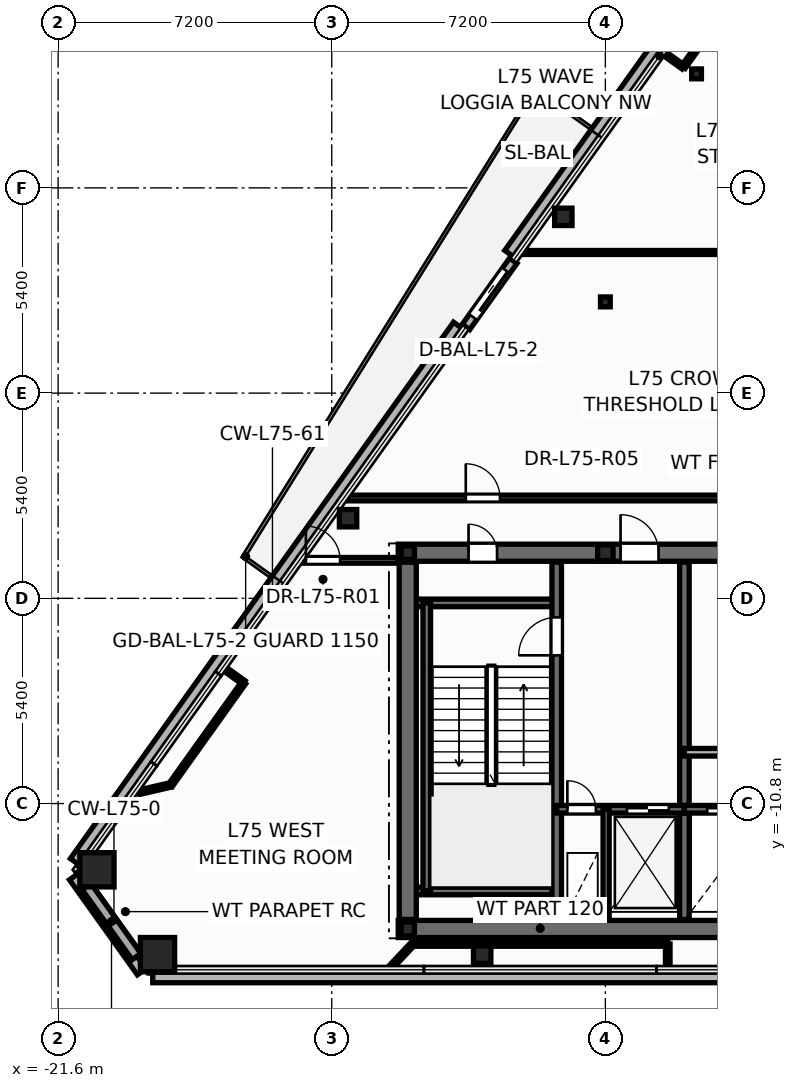
"""IFC4 building model, lengths in metres.
Left out: names, types, materials, properties, quantities, classifications, styles, units other than length and angle.
Written with IfcOpenShell. Run it as: python <this file> out.ifc"""

import sys

from ifc_helpers import new_model, si_unit, direction, frame, frame_2d, origin, origin_2d, place, context, subcontext, project, spatial, rectangle, hollow_rectangle, hollow_circle, i_section, extrude, element, fill, save


model = new_model("IFC4")
c1 = context("Model", 3, precision=1e-05, world=origin(), true_north=direction((0.0, 1.0)))
c2 = subcontext(c1, "Body", "Model", "MODEL_VIEW")
j1 = project(units=[si_unit("LENGTHUNIT", "METRE"), si_unit("PLANEANGLEUNIT", "RADIAN")], contexts=[c1])
p1 = place(None, origin())
s1 = spatial("IfcSite", under=j1, at=p1, CompositionType="ELEMENT")
p2 = place(p1, origin())
s2 = spatial("IfcBuilding", under=s1, at=p2, CompositionType="ELEMENT")
p3 = place(p2, frame((0.0, 0.0, 285.0)))
s3 = spatial("IfcBuildingStorey", under=s2, at=p3, CompositionType="ELEMENT", Elevation=285.0)
for number, where, z_axis, x_axis in (
    (1, (-20.579, -12.543, 0.0), (0.0, 0.0, 1.0), (1.0, 0.0, 0.0)),
    (2, (-18.985, -14.774, 0.0), (0.0, 0.0, 1.0), (1.0, 0.0, 0.0)),
):
    element("IfcColumn", number, at=place(p3, frame(where, z_axis=z_axis, x_axis=x_axis)), inside=s3, PredefinedType="COLUMN", context=c2, shape_type="SweptSolid", body=[
        extrude(hollow_rectangle(XDim=0.9, YDim=0.9, WallThickness=0.04, at=origin_2d()), origin(), (0.0, 0.0, 1.0), 4.2),
    ])
for number, where, z_axis, x_axis in (
    (3, (-10.442, -14.774, 0.0), (0.0, 0.0, 1.0), (1.0, 0.0, 0.0)),
    (4, (-8.306, 4.638, 0.0), (0.0, 0.0, 1.0), (1.0, 0.0, 0.0)),
    (5, (-13.97, -3.292, 0.0), (0.0, 0.0, 1.0), (1.0, 0.0, 0.0)),
):
    element("IfcColumn", number, at=place(p3, frame(where, z_axis=z_axis, x_axis=x_axis)), inside=s3, PredefinedType="COLUMN", context=c2, shape_type="SweptSolid", body=[
        extrude(hollow_circle(Radius=0.229, WallThickness=0.016, at=origin_2d()), origin(), (0.0, 0.0, 1.0), 4.2),
    ])
for number, where, z_axis, x_axis in (
    (6, (-12.4, -14.1, 0.0), (0.0, 0.0, 1.0), (1.0, 0.0, 0.0)),
    (7, (-12.4, -4.2, 0.0), (0.0, 0.0, 1.0), (1.0, 0.0, 0.0)),
):
    element("IfcColumn", number, at=place(p3, frame(where, z_axis=z_axis, x_axis=x_axis)), inside=s3, PredefinedType="COLUMN", context=c2, shape_type="SweptSolid", body=[
        extrude(i_section(OverallWidth=0.352, OverallDepth=0.359, WebThickness=0.018, FlangeThickness=0.026, at=origin_2d()), origin(), (0.0, 0.0, 1.0), 4.2),
    ])
p4 = place(p3, frame((-7.2, -4.2, 0.0), z_axis=(0.0, 0.0, 1.0), x_axis=(1.0, 0.0, 0.0)))
e8 = element("IfcColumn", 8, at=p4, inside=s3, PredefinedType="PILASTER", context=c2, shape_type="SweptSolid", body=[
    extrude(i_section(OverallWidth=0.405, OverallDepth=0.414, WebThickness=0.022, FlangeThickness=0.032, at=origin_2d()), origin(), (0.0, 0.0, 1.0), 4.2),
])
for number, where, z_axis, x_axis in (
    (9, (-7.2, 2.4, 0.0), (0.0, 0.0, 1.0), (1.0, 0.0, 0.0)),
    (10, (-4.8, 8.4, 0.0), (0.0, 0.0, 1.0), (1.0, 0.0, 0.0)),
):
    element("IfcColumn", number, at=place(p3, frame(where, z_axis=z_axis, x_axis=x_axis)), inside=s3, PredefinedType="COLUMN", context=c2, shape_type="SweptSolid", body=[
        extrude(i_section(OverallWidth=0.256, OverallDepth=0.26, WebThickness=0.01, FlangeThickness=0.017, at=origin_2d()), origin(), (0.0, 0.0, 1.0), 4.2),
    ])
p5 = place(p3, frame((-21.154, -12.701, -0.2), z_axis=(0.0, 0.0, 1.0), x_axis=(0.581260731052, -0.813717372641, 0.0)))
e11 = element("IfcWall", 11, at=p5, inside=s3, PredefinedType="PARAPET", context=c2, shape_type="SweptSolid", body=[
    extrude(rectangle(XDim=3.074, YDim=0.36, at=frame_2d((1.537, 0.0))), origin(), (0.0, 0.0, 1.0), 0.38),
])
p6 = place(p3, frame((-19.111, -15.334, -0.2), z_axis=(0.0, 0.0, 1.0), x_axis=(1.0, 0.0, 0.0)))
e12 = element("IfcWall", 12, at=p6, inside=s3, PredefinedType="PARAPET", context=c2, shape_type="SweptSolid", body=[
    extrude(rectangle(XDim=38.221, YDim=0.36, at=frame_2d((19.111, 0.0))), origin(), (0.0, 0.0, 1.0), 0.38),
])
p7 = place(p3, frame((-2.104, 14.285, -0.2), z_axis=(0.0, 0.0, 1.0), x_axis=(-0.581243494246, -0.81372968509, 0.0)))
e13 = element("IfcWall", 13, at=p7, inside=s3, PredefinedType="PARAPET", context=c2, shape_type="SweptSolid", body=[
    extrude(rectangle(XDim=13.071, YDim=0.36, at=frame_2d((6.536, 0.0))), origin(), (0.0, 0.0, 1.0), 0.38),
])
p8 = place(p3, frame((-11.05, 1.761, -0.2), z_axis=(0.0, 0.0, 1.0), x_axis=(-0.581240856875, -0.813731568946, 0.0)))
e14 = element("IfcWall", 14, at=p8, inside=s3, PredefinedType="PARAPET", context=c2, shape_type="SweptSolid", body=[
    extrude(rectangle(XDim=17.344, YDim=0.36, at=frame_2d((8.672, 0.0))), origin(), (0.0, 0.0, 1.0), 0.38),
])
p9 = place(p3, frame((-9.623, 3.482, -0.015), z_axis=(0.0, 0.0, 1.0), x_axis=(-0.581238193719, -0.813733471207, 0.0)))
e15 = element("IfcWall", 15, at=p9, inside=s3, PredefinedType="STANDARD", context=c2, shape_type="SweptSolid", body=[
    extrude(rectangle(XDim=2.14, YDim=0.24, at=frame_2d((1.07, 0.0))), origin(), (0.0, 0.0, 1.0), 3.453),
])
p10 = place(p9, frame((0.32, 0.0, 0.015)))
e16 = element("IfcOpeningElement", 16, at=p10, cuts=e15, PredefinedType="OPENING", context=c2, shape_type="SweptSolid", body=[
    extrude(rectangle(XDim=1.506, YDim=2.204, at=frame_2d((0.75, 1.102))), frame((0.0, 0.13, 0.0), z_axis=(0.0, -1.0, 0.0), x_axis=(1.0, 0.0, 0.0)), (0.0, 0.0, 1.0), 0.26),
])
p11 = place(p3, frame((-12.65, -14.1, 0.0), z_axis=(0.0, 0.0, 1.0), x_axis=(1.0, 0.0, 0.0)))
e17 = element("IfcWall", 17, at=p11, inside=s3, PredefinedType="SHEAR", context=c2, shape_type="SweptSolid", body=[
    extrude(rectangle(XDim=25.3, YDim=0.45, at=frame_2d((12.65, 0.0))), origin(), (0.0, 0.0, 1.0), 4.2),
])
p12 = place(p3, frame((-12.65, -4.2, 0.0), z_axis=(0.0, 0.0, 1.0), x_axis=(1.0, 0.0, 0.0)))
e18 = element("IfcWall", 18, at=p12, inside=s3, PredefinedType="SHEAR", context=c2, shape_type="SweptSolid", body=[
    extrude(rectangle(XDim=25.3, YDim=0.45, at=frame_2d((12.65, 0.0))), origin(), (0.0, 0.0, 1.0), 4.2),
])
p13 = place(p12, frame((1.85, 0.0, 0.0)))
e19 = element("IfcOpeningElement", 19, at=p13, cuts=e18, PredefinedType="OPENING", context=c2, shape_type="SweptSolid", body=[
    extrude(rectangle(XDim=0.756, YDim=2.054, at=frame_2d((0.375, 1.027))), frame((0.0, 0.235, 0.0), z_axis=(0.0, -1.0, 0.0), x_axis=(1.0, 0.0, 0.0)), (0.0, 0.0, 1.0), 0.47),
])
p14 = place(p12, frame((22.65, 0.0, 0.0)))
e20 = element("IfcOpeningElement", 20, at=p14, cuts=e18, PredefinedType="OPENING", context=c2, shape_type="SweptSolid", body=[
    extrude(rectangle(XDim=0.756, YDim=2.054, at=frame_2d((0.375, 1.027))), frame((0.0, 0.235, 0.0), z_axis=(0.0, -1.0, 0.0), x_axis=(1.0, 0.0, 0.0)), (0.0, 0.0, 1.0), 0.47),
])
p15 = place(p12, frame((5.85, 0.0, 0.0)))
e21 = element("IfcOpeningElement", 21, at=p15, cuts=e18, PredefinedType="OPENING", context=c2, shape_type="SweptSolid", body=[
    extrude(rectangle(XDim=1.006, YDim=2.104, at=frame_2d((0.5, 1.052))), frame((0.0, 0.235, 0.0), z_axis=(0.0, -1.0, 0.0), x_axis=(1.0, 0.0, 0.0)), (0.0, 0.0, 1.0), 0.47),
])
p16 = place(p12, frame((10.35, 0.0, 0.0)))
e22 = element("IfcOpeningElement", 22, at=p16, cuts=e18, PredefinedType="OPENING", context=c2, shape_type="SweptSolid", body=[
    extrude(rectangle(XDim=1.406, YDim=2.154, at=frame_2d((0.7, 1.077))), frame((0.0, 0.235, 0.0), z_axis=(0.0, -1.0, 0.0), x_axis=(1.0, 0.0, 0.0)), (0.0, 0.0, 1.0), 0.47),
])
p17 = place(p12, frame((18.45, 0.0, 0.0)))
e23 = element("IfcOpeningElement", 23, at=p17, cuts=e18, PredefinedType="OPENING", context=c2, shape_type="SweptSolid", body=[
    extrude(rectangle(XDim=1.006, YDim=2.104, at=frame_2d((0.5, 1.052))), frame((0.0, 0.235, 0.0), z_axis=(0.0, -1.0, 0.0), x_axis=(1.0, 0.0, 0.0)), (0.0, 0.0, 1.0), 0.47),
])
for number, where, z_axis, x_axis in (
    (24, (-12.35, -5.52, 0.0), (0.0, 0.0, 1.0), (1.0, 0.0, 0.0)),
    (25, (-12.35, -13.1, 0.0), (0.0, 0.0, 1.0), (1.0, 0.0, 0.0)),
):
    element("IfcWall", number, at=place(p3, frame(where, z_axis=z_axis, x_axis=x_axis)), inside=s3, PredefinedType="SOLIDWALL", context=c2, shape_type="SweptSolid", body=[
        extrude(rectangle(XDim=3.87, YDim=0.2, at=frame_2d((1.935, 0.0))), origin(), (0.0, 0.0, 1.0), 4.2),
    ])
p18 = place(p3, frame((-11.9, -13.1, 0.0), z_axis=(0.0, 0.0, 1.0), x_axis=(0.0, 1.0, 0.0)))
e26 = element("IfcWall", 26, at=p18, inside=s3, PredefinedType="SOLIDWALL", context=c2, shape_type="SweptSolid", body=[
    extrude(rectangle(XDim=7.58, YDim=0.2, at=frame_2d((3.79, 0.0))), origin(), (0.0, 0.0, 1.0), 4.2),
])
p19 = place(p3, frame((-8.48, -13.85, 0.0), z_axis=(0.0, 0.0, 1.0), x_axis=(0.0, 1.0, 0.0)))
e27 = element("IfcWall", 27, at=p19, inside=s3, PredefinedType="SHEAR", context=c2, shape_type="SweptSolid", body=[
    extrude(rectangle(XDim=9.4, YDim=0.25, at=frame_2d((4.7, 0.0))), origin(), (0.0, 0.0, 1.0), 4.2),
])
p20 = place(p19, frame((6.95, 0.0, 0.0)))
e28 = element("IfcOpeningElement", 28, at=p20, cuts=e27, PredefinedType="OPENING", context=c2, shape_type="SweptSolid", body=[
    extrude(rectangle(XDim=1.006, YDim=2.104, at=frame_2d((0.5, 1.052))), frame((0.0, 0.135, 0.0), z_axis=(0.0, -1.0, 0.0), x_axis=(1.0, 0.0, 0.0)), (0.0, 0.0, 1.0), 0.27),
])
p21 = place(p3, frame((-5.12, -13.85, 0.0), z_axis=(0.0, 0.0, 1.0), x_axis=(0.0, 1.0, 0.0)))
e29 = element("IfcWall", 29, at=p21, inside=s3, PredefinedType="SHEAR", context=c2, shape_type="SweptSolid", body=[
    extrude(rectangle(XDim=9.4, YDim=0.25, at=frame_2d((4.7, 0.0))), origin(), (0.0, 0.0, 1.0), 4.2),
])
p22 = place(p3, frame((-8.48, -10.95, 0.0), z_axis=(0.0, 0.0, 1.0), x_axis=(1.0, 0.0, 0.0)))
e30 = element("IfcWall", 30, at=p22, inside=s3, PredefinedType="SOLIDWALL", context=c2, shape_type="SweptSolid", body=[
    extrude(rectangle(XDim=3.36, YDim=0.2, at=frame_2d((1.68, 0.0))), origin(), (0.0, 0.0, 1.0), 4.2),
])
p23 = place(p22, frame((0.28, 0.0, 0.0)))
e31 = element("IfcOpeningElement", 31, at=p23, cuts=e30, PredefinedType="OPENING", context=c2, shape_type="SweptSolid", body=[
    extrude(rectangle(XDim=0.756, YDim=2.054, at=frame_2d((0.375, 1.027))), frame((0.0, 0.11, 0.0), z_axis=(0.0, -1.0, 0.0), x_axis=(1.0, 0.0, 0.0)), (0.0, 0.0, 1.0), 0.22),
])
p24 = place(p22, frame((1.85, 0.0, 0.0)))
e32 = element("IfcOpeningElement", 32, at=p24, cuts=e30, PredefinedType="OPENING", context=c2, shape_type="SweptSolid", body=[
    extrude(rectangle(XDim=1.106, YDim=2.104, at=frame_2d((0.55, 1.052))), frame((0.0, 0.11, 0.0), z_axis=(0.0, -1.0, 0.0), x_axis=(1.0, 0.0, 0.0)), (0.0, 0.0, 1.0), 0.22),
])
p25 = place(p3, frame((-5.12, -10.95, 0.0), z_axis=(0.0, 0.0, 1.0), x_axis=(1.0, 0.0, 0.0)))
e33 = element("IfcWall", 33, at=p25, inside=s3, PredefinedType="SOLIDWALL", context=c2, shape_type="SweptSolid", body=[
    extrude(rectangle(XDim=10.24, YDim=0.2, at=frame_2d((5.12, 0.0))), origin(), (0.0, 0.0, 1.0), 4.2),
])
p26 = place(p25, frame((0.6, 0.0, 0.0)))
e34 = element("IfcOpeningElement", 34, at=p26, cuts=e33, PredefinedType="OPENING", context=c2, shape_type="SweptSolid", body=[
    extrude(rectangle(XDim=1.106, YDim=2.104, at=frame_2d((0.55, 1.052))), frame((0.0, 0.11, 0.0), z_axis=(0.0, -1.0, 0.0), x_axis=(1.0, 0.0, 0.0)), (0.0, 0.0, 1.0), 0.22),
])
p27 = place(p25, frame((2.67, 0.0, 0.0)))
e35 = element("IfcOpeningElement", 35, at=p27, cuts=e33, PredefinedType="OPENING", context=c2, shape_type="SweptSolid", body=[
    extrude(rectangle(XDim=1.106, YDim=2.104, at=frame_2d((0.55, 1.052))), frame((0.0, 0.11, 0.0), z_axis=(0.0, -1.0, 0.0), x_axis=(1.0, 0.0, 0.0)), (0.0, 0.0, 1.0), 0.22),
])
p28 = place(p25, frame((4.57, 0.0, 0.0)))
e36 = element("IfcOpeningElement", 36, at=p28, cuts=e33, PredefinedType="OPENING", context=c2, shape_type="SweptSolid", body=[
    extrude(rectangle(XDim=1.106, YDim=2.104, at=frame_2d((0.55, 1.052))), frame((0.0, 0.11, 0.0), z_axis=(0.0, -1.0, 0.0), x_axis=(1.0, 0.0, 0.0)), (0.0, 0.0, 1.0), 0.22),
])
p29 = place(p25, frame((6.47, 0.0, 0.0)))
e37 = element("IfcOpeningElement", 37, at=p29, cuts=e33, PredefinedType="OPENING", context=c2, shape_type="SweptSolid", body=[
    extrude(rectangle(XDim=1.106, YDim=2.104, at=frame_2d((0.55, 1.052))), frame((0.0, 0.11, 0.0), z_axis=(0.0, -1.0, 0.0), x_axis=(1.0, 0.0, 0.0)), (0.0, 0.0, 1.0), 0.22),
])
p30 = place(p25, frame((8.54, 0.0, 0.0)))
e38 = element("IfcOpeningElement", 38, at=p30, cuts=e33, PredefinedType="OPENING", context=c2, shape_type="SweptSolid", body=[
    extrude(rectangle(XDim=1.106, YDim=2.104, at=frame_2d((0.55, 1.052))), frame((0.0, 0.11, 0.0), z_axis=(0.0, -1.0, 0.0), x_axis=(1.0, 0.0, 0.0)), (0.0, 0.0, 1.0), 0.22),
])
p31 = place(p3, frame((-7.18, -13.85, 0.0), z_axis=(0.0, 0.0, 1.0), x_axis=(0.0, 1.0, 0.0)))
e39 = element("IfcWall", 39, at=p31, inside=s3, PredefinedType="PARTITIONING", context=c2, shape_type="SweptSolid", body=[
    extrude(rectangle(XDim=2.9, YDim=0.16, at=frame_2d((1.45, 0.0))), origin(), (0.0, 0.0, 1.0), 3.145),
])
p32 = place(p3, frame((-12.4, -13.85, 0.0), z_axis=(0.0, 0.0, 1.0), x_axis=(0.0, 1.0, 0.0)))
e40 = element("IfcWall", 40, at=p32, inside=s3, PredefinedType="SHEAR", context=c2, shape_type="SweptSolid", body=[
    extrude(rectangle(XDim=9.4, YDim=0.45, at=frame_2d((4.7, 0.0))), origin(), (0.0, 0.0, 1.0), 4.2),
])
p33 = place(p3, frame((-5.12, -9.45, 0.0), z_axis=(0.0, 0.0, 1.0), x_axis=(1.0, 0.0, 0.0)))
e41 = element("IfcWall", 41, at=p33, inside=s3, PredefinedType="SOLIDWALL", context=c2, shape_type="SweptSolid", body=[
    extrude(rectangle(XDim=2.24, YDim=0.2, at=frame_2d((1.12, 0.0))), origin(), (0.0, 0.0, 1.0), 3.92),
])
p34 = place(p3, frame((-14.082, -2.76, 0.0), z_axis=(0.0, 0.0, 1.0), x_axis=(1.0, 0.0, 0.0)))
e42 = element("IfcWall", 42, at=p34, inside=s3, PredefinedType="PARTITIONING", context=c2, shape_type="SweptSolid", body=[
    extrude(rectangle(XDim=12.002, YDim=0.15, at=frame_2d((6.001, 0.0))), origin(), (0.0, 0.0, 1.0), 2.895),
])
p35 = place(p34, frame((3.209, 0.0, 0.0)))
e43 = element("IfcOpeningElement", 43, at=p35, cuts=e42, PredefinedType="OPENING", context=c2, shape_type="SweptSolid", body=[
    extrude(rectangle(XDim=0.906, YDim=2.104, at=frame_2d((0.45, 1.052))), frame((0.0, 0.085, 0.0), z_axis=(0.0, -1.0, 0.0), x_axis=(1.0, 0.0, 0.0)), (0.0, 0.0, 1.0), 0.17),
])
p36 = place(p3, frame((-9.468, 3.7, 0.0), z_axis=(0.0, 0.0, 1.0), x_axis=(1.0, 0.0, 0.0)))
e44 = element("IfcWall", 44, at=p36, inside=s3, PredefinedType="PARTITIONING", context=c2, shape_type="SweptSolid", body=[
    extrude(rectangle(XDim=10.108, YDim=0.105, at=frame_2d((5.054, 0.0))), origin(), (0.0, 0.0, 1.0), 2.895),
])
p37 = place(p3, frame((-12.27, -14.494, 0.0), z_axis=(0.0, 0.0, 1.0), x_axis=(1.0, 0.0, 0.0)))
e45 = element("IfcWall", 45, at=p37, inside=s3, PredefinedType="PARTITIONING", context=c2, shape_type="SweptSolid", body=[
    extrude(rectangle(XDim=6.711, YDim=0.12, at=frame_2d((3.356, 0.0))), origin(), (0.0, 0.0, 1.0), 3.438),
])
p38 = place(p3, frame((-16.716, -7.616, 0.0), z_axis=(0.0, 0.0, 1.0), x_axis=(-0.581217264706, -0.813748420095, 0.0)))
e46 = element("IfcWall", 46, at=p38, inside=s3, PredefinedType="PARTITIONING", context=c2, shape_type="SweptSolid", body=[
    extrude(rectangle(XDim=3.31, YDim=0.12, at=frame_2d((1.655, 0.0))), origin(), (0.0, 0.0, 1.0), 2.895),
])
p39 = place(p3, frame((-3.223, 11.272, 0.0), z_axis=(0.0, 0.0, 1.0), x_axis=(-0.581217264706, -0.813748420095, 0.0)))
e47 = element("IfcWall", 47, at=p39, inside=s3, PredefinedType="PARTITIONING", context=c2, shape_type="SweptSolid", body=[
    extrude(rectangle(XDim=3.31, YDim=0.12, at=frame_2d((1.655, 0.0))), origin(), (0.0, 0.0, 1.0), 3.293),
])
p40 = place(p3, frame((-15.254, -4.4, 0.0), z_axis=(0.0, 0.0, 1.0), x_axis=(1.0, 0.0, 0.0)))
e48 = element("IfcWall", 48, at=p40, inside=s3, PredefinedType="PARTITIONING", context=c2, shape_type="SweptSolid", body=[
    extrude(rectangle(XDim=2.602, YDim=0.15, at=frame_2d((1.301, 0.0))), origin(), (0.0, 0.0, 1.0), 2.895),
])
p41 = place(p40, frame((0.174, 0.0, 0.0)))
e49 = element("IfcOpeningElement", 49, at=p41, cuts=e48, PredefinedType="OPENING", context=c2, shape_type="SweptSolid", body=[
    extrude(rectangle(XDim=0.906, YDim=2.104, at=frame_2d((0.45, 1.052))), frame((0.0, 0.085, 0.0), z_axis=(0.0, -1.0, 0.0), x_axis=(1.0, 0.0, 0.0)), (0.0, 0.0, 1.0), 0.17),
])
p42 = place(p3, frame((-18.64, -10.31, 0.0), z_axis=(0.0, 0.0, 1.0), x_axis=(-0.974134409857, -0.22596935972, 0.0)))
e50 = element("IfcWall", 50, at=p42, inside=s3, PredefinedType="PARTITIONING", context=c2, shape_type="SweptSolid", body=[
    extrude(rectangle(XDim=0.851, YDim=0.12, at=frame_2d((0.426, 0.0))), origin(), (0.0, 0.0, 1.0), 2.895),
])
p43 = place(p3, frame((-12.851, -15.113, 0.0), z_axis=(0.0, 0.0, 1.0), x_axis=(0.685203170989, 0.728351985283, 0.0)))
e51 = element("IfcWall", 51, at=p43, inside=s3, PredefinedType="PARTITIONING", context=c2, shape_type="SweptSolid", body=[
    extrude(rectangle(XDim=0.849, YDim=0.12, at=frame_2d((0.424, 0.0))), origin(), (0.0, 0.0, 1.0), 3.438),
])
p44 = place(p3, frame((-5.147, 8.579, 0.0), z_axis=(0.0, 0.0, 1.0), x_axis=(-0.813561114612, 0.581479417341, 0.0)))
e52 = element("IfcWall", 52, at=p44, inside=s3, PredefinedType="PARTITIONING", context=c2, shape_type="SweptSolid", body=[
    extrude(rectangle(XDim=0.67, YDim=0.12, at=frame_2d((0.335, 0.0))), origin(), (0.0, 0.0, 1.0), 3.438),
])
p45 = place(p3, frame((-5.558, -14.494, 0.0), z_axis=(0.0, 0.0, 1.0), x_axis=(0.0, -1.0, 0.0)))
e53 = element("IfcWall", 53, at=p45, inside=s3, PredefinedType="PARTITIONING", context=c2, shape_type="SweptSolid", body=[
    extrude(rectangle(XDim=0.67, YDim=0.12, at=frame_2d((0.335, 0.0))), origin(), (0.0, 0.0, 1.0), 3.438),
])
p46 = place(p3, frame((-17.26, -7.227, 0.0), z_axis=(0.0, 0.0, 1.0), x_axis=(0.813610304042, -0.581410589134, 0.0)))
e54 = element("IfcWall", 54, at=p46, inside=s3, PredefinedType="PARTITIONING", context=c2, shape_type="SweptSolid", body=[
    extrude(rectangle(XDim=0.67, YDim=0.12, at=frame_2d((0.335, 0.0))), origin(), (0.0, 0.0, 1.0), 3.438),
])
p47 = place(p10, origin())
e55 = element("IfcDoor", 55, at=p47, inside=s3, OperationType="SLIDING_TO_RIGHT", PredefinedType="DOOR", context=c2, shape_type="SweptSolid", body=[
    extrude(rectangle(XDim=1.5, YDim=2.2, at=frame_2d((0.75, 1.1))), frame((0.0, 0.025, 0.0), z_axis=(0.0, -1.0, 0.0), x_axis=(1.0, 0.0, 0.0)), (0.0, 0.0, 1.0), 0.05),
])
fill(e16, e55)
p48 = place(p20, origin())
e56 = element("IfcDoor", 56, at=p48, inside=s3, OperationType="SINGLE_SWING_LEFT", PredefinedType="DOOR", context=c2, shape_type="SweptSolid", body=[
    extrude(rectangle(XDim=1.0, YDim=2.1, at=frame_2d((0.5, 1.05))), frame((0.0, 0.025, 0.0), z_axis=(0.0, -1.0, 0.0), x_axis=(1.0, 0.0, 0.0)), (0.0, 0.0, 1.0), 0.05),
])
fill(e28, e56)
p49 = place(p23, origin())
e57 = element("IfcDoor", 57, at=p49, inside=s3, OperationType="SINGLE_SWING_LEFT", PredefinedType="DOOR", context=c2, shape_type="SweptSolid", body=[
    extrude(rectangle(XDim=0.75, YDim=2.05, at=frame_2d((0.375, 1.025))), frame((0.0, 0.025, 0.0), z_axis=(0.0, -1.0, 0.0), x_axis=(1.0, 0.0, 0.0)), (0.0, 0.0, 1.0), 0.05),
])
fill(e31, e57)
p50 = place(p24, origin())
e58 = element("IfcDoor", 58, at=p50, inside=s3, OperationType="DOUBLE_DOOR_SLIDING", PredefinedType="DOOR", context=c2, shape_type="SweptSolid", body=[
    extrude(rectangle(XDim=1.1, YDim=2.1, at=frame_2d((0.55, 1.05))), frame((0.0, 0.025, 0.0), z_axis=(0.0, -1.0, 0.0), x_axis=(1.0, 0.0, 0.0)), (0.0, 0.0, 1.0), 0.05),
])
fill(e32, e58)
p51 = place(p26, origin())
e59 = element("IfcDoor", 59, at=p51, inside=s3, OperationType="DOUBLE_DOOR_SLIDING", PredefinedType="DOOR", context=c2, shape_type="SweptSolid", body=[
    extrude(rectangle(XDim=1.1, YDim=2.1, at=frame_2d((0.55, 1.05))), frame((0.0, 0.025, 0.0), z_axis=(0.0, -1.0, 0.0), x_axis=(1.0, 0.0, 0.0)), (0.0, 0.0, 1.0), 0.05),
])
fill(e34, e59)
p52 = place(p13, origin())
e60 = element("IfcDoor", 60, at=p52, inside=s3, OperationType="SINGLE_SWING_LEFT", PredefinedType="DOOR", context=c2, shape_type="SweptSolid", body=[
    extrude(rectangle(XDim=0.75, YDim=2.05, at=frame_2d((0.375, 1.025))), frame((0.0, 0.025, 0.0), z_axis=(0.0, -1.0, 0.0), x_axis=(1.0, 0.0, 0.0)), (0.0, 0.0, 1.0), 0.05),
])
fill(e19, e60)
p53 = place(p15, origin())
e61 = element("IfcDoor", 61, at=p53, inside=s3, OperationType="SINGLE_SWING_LEFT", PredefinedType="DOOR", context=c2, shape_type="SweptSolid", body=[
    extrude(rectangle(XDim=1.0, YDim=2.1, at=frame_2d((0.5, 1.05))), frame((0.0, 0.025, 0.0), z_axis=(0.0, -1.0, 0.0), x_axis=(1.0, 0.0, 0.0)), (0.0, 0.0, 1.0), 0.05),
])
fill(e21, e61)
p54 = place(p41, origin())
e62 = element("IfcDoor", 62, at=p54, inside=s3, OperationType="SINGLE_SWING_LEFT", PredefinedType="DOOR", context=c2, shape_type="SweptSolid", body=[
    extrude(rectangle(XDim=0.9, YDim=2.1, at=frame_2d((0.45, 1.05))), frame((0.0, 0.025, 0.0), z_axis=(0.0, -1.0, 0.0), x_axis=(1.0, 0.0, 0.0)), (0.0, 0.0, 1.0), 0.05),
])
fill(e49, e62)
p55 = place(p35, origin())
e63 = element("IfcDoor", 63, at=p55, inside=s3, OperationType="SINGLE_SWING_LEFT", PredefinedType="DOOR", context=c2, shape_type="SweptSolid", body=[
    extrude(rectangle(XDim=0.9, YDim=2.1, at=frame_2d((0.45, 1.05))), frame((0.0, 0.025, 0.0), z_axis=(0.0, -1.0, 0.0), x_axis=(1.0, 0.0, 0.0)), (0.0, 0.0, 1.0), 0.05),
])
fill(e43, e63)
save(model, sys.argv[1])
